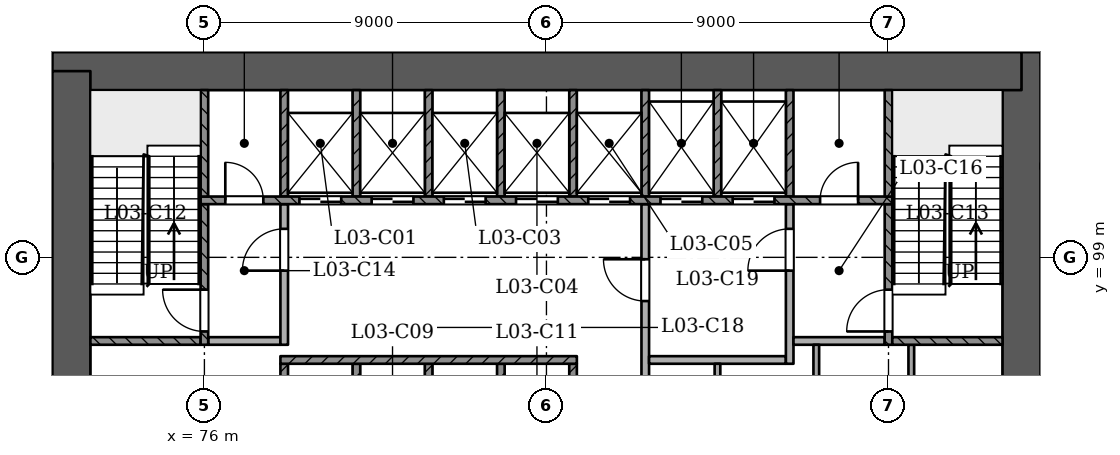
"""IFC4 building model, lengths in metres.
Left out: names, types, materials, properties, quantities, classifications, styles, units other than length and angle.
Written with IfcOpenShell. Run it as: python <this file> out.ifc"""

import sys

from ifc_helpers import new_model, si_unit, direction, frame, frame_2d, origin, place, context, subcontext, project, spatial, rectangle, extrude, element, fill, save


model = new_model("IFC4")
c1 = context("Model", 3, precision=1e-05, world=origin(), true_north=direction((0.0, 1.0)))
c2 = subcontext(c1, "Body", "Model", "MODEL_VIEW")
j1 = project(units=[si_unit("LENGTHUNIT", "METRE"), si_unit("PLANEANGLEUNIT", "RADIAN")], contexts=[c1])
p1 = place(None, origin())
s1 = spatial("IfcSite", under=j1, at=p1, CompositionType="ELEMENT")
p2 = place(p1, origin())
s2 = spatial("IfcBuilding", under=s1, at=p2, CompositionType="ELEMENT")
p3 = place(p2, frame((0.0, 0.0, 18.0)))
s3 = spatial("IfcBuildingStorey", under=s2, at=p3, CompositionType="ELEMENT", Elevation=18.0)
p4 = place(p3, frame((97.5, 92.9, 0.0), z_axis=(0.0, 0.0, 1.0), x_axis=(0.0, 1.0, 0.0)))
e1 = element("IfcWall", 1, at=p4, inside=s3, PredefinedType="SHEAR", context=c2, shape_type="SweptSolid", body=[
    extrude(rectangle(XDim=11.5, YDim=1.0, at=frame_2d((5.75, 0.0))), origin(), (0.0, 0.0, 1.0), 4.5),
])
p5 = place(p3, frame((97.5, 103.9, 0.0), z_axis=(0.0, 0.0, 1.0), x_axis=(-1.0, 0.0, 0.0)))
e2 = element("IfcWall", 2, at=p5, inside=s3, PredefinedType="SHEAR", context=c2, shape_type="SweptSolid", body=[
    extrude(rectangle(XDim=25.5, YDim=1.0, at=frame_2d((12.75, 0.0))), origin(), (0.0, 0.0, 1.0), 4.5),
])
p6 = place(p3, frame((72.5, 103.9, 0.0), z_axis=(0.0, 0.0, 1.0), x_axis=(0.0, -1.0, 0.0)))
e3 = element("IfcWall", 3, at=p6, inside=s3, PredefinedType="SHEAR", context=c2, shape_type="SweptSolid", body=[
    extrude(rectangle(XDim=11.5, YDim=1.0, at=frame_2d((5.75, 0.0))), origin(), (0.0, 0.0, 1.0), 4.5),
])
for number, where, z_axis, x_axis in (
    (4, (99.726, 101.4, 0.0), (0.0, 0.0, 1.0), (-1.0, 0.0, 0.0)),
    (5, (72.0, 101.401, 0.0), (0.0, 0.0, 1.0), (-1.0, -0.0, 0.0)),
):
    element("IfcWall", number, at=place(p3, frame(where, z_axis=z_axis, x_axis=x_axis)), inside=s3, PredefinedType="PARTITIONING", context=c2, shape_type="SweptSolid", body=[
        extrude(rectangle(XDim=1.726, YDim=0.15, at=frame_2d((0.863, 0.0))), origin(), (0.0, 0.0, 1.0), 4.05),
    ])
for number, where, z_axis, x_axis in (
    (6, (78.1, 93.4, 0.0), (0.0, 0.0, 1.0), (0.0, 1.0, 0.0)),
    (7, (80.0, 93.4, 0.0), (0.0, 0.0, 1.0), (0.0, 1.0, 0.0)),
    (8, (81.9, 93.4, 0.0), (0.0, 0.0, 1.0), (0.0, 1.0, 0.0)),
    (9, (83.8, 93.4, 0.0), (0.0, 0.0, 1.0), (0.0, 1.0, 0.0)),
    (10, (85.7, 93.4, 0.0), (0.0, 0.0, 1.0), (0.0, 1.0, 0.0)),
):
    element("IfcWall", number, at=place(p3, frame(where, z_axis=z_axis, x_axis=x_axis)), inside=s3, PredefinedType="SOLIDWALL", context=c2, shape_type="SweptSolid", body=[
        extrude(rectangle(XDim=2.8, YDim=0.2, at=frame_2d((1.4, 0.0))), origin(), (0.0, 0.0, 1.0), 4.05),
    ])
p7 = place(p3, frame((87.6, 93.4, 0.0), z_axis=(0.0, 0.0, 1.0), x_axis=(0.0, 1.0, 0.0)))
e11 = element("IfcWall", 11, at=p7, inside=s3, PredefinedType="PARTITIONING", context=c2, shape_type="SweptSolid", body=[
    extrude(rectangle(XDim=7.0, YDim=0.2, at=frame_2d((3.5, 0.0))), origin(), (0.0, 0.0, 1.0), 4.05),
])
p8 = place(p7, frame((4.45, 0.0, 0.0)))
e12 = element("IfcOpeningElement", 12, at=p8, cuts=e11, PredefinedType="OPENING", context=c2, shape_type="SweptSolid", body=[
    extrude(rectangle(XDim=1.1, YDim=2.1, at=frame_2d((0.55, 1.05))), frame((0.0, 0.11, 0.0), z_axis=(0.0, -1.0, 0.0), x_axis=(1.0, 0.0, 0.0)), (0.0, 0.0, 1.0), 0.221),
])
p9 = place(p3, frame((89.5, 93.4, 0.0), z_axis=(0.0, 0.0, 1.0), x_axis=(0.0, 1.0, 0.0)))
e13 = element("IfcWall", 13, at=p9, inside=s3, PredefinedType="PARTITIONING", context=c2, shape_type="SweptSolid", body=[
    extrude(rectangle(XDim=2.8, YDim=0.15, at=frame_2d((1.4, 0.0))), origin(), (0.0, 0.0, 1.0), 4.05),
])
for number, where, z_axis, x_axis in (
    (14, (92.1, 93.4, 0.0), (0.0, 0.0, 1.0), (0.0, 1.0, 0.0)),
    (15, (94.6, 93.4, 0.0), (0.0, 0.0, 1.0), (0.0, 1.0, 0.0)),
):
    element("IfcWall", number, at=place(p3, frame(where, z_axis=z_axis, x_axis=x_axis)), inside=s3, PredefinedType="PARTITIONING", context=c2, shape_type="SweptSolid", body=[
        extrude(rectangle(XDim=3.3, YDim=0.15, at=frame_2d((1.65, 0.0))), origin(), (0.0, 0.0, 1.0), 4.05),
    ])
p10 = place(p3, frame((78.0, 96.3, 0.0), z_axis=(0.0, 0.0, 1.0), x_axis=(1.0, 0.0, 0.0)))
e16 = element("IfcWall", 16, at=p10, inside=s3, PredefinedType="SOLIDWALL", context=c2, shape_type="SweptSolid", body=[
    extrude(rectangle(XDim=7.8, YDim=0.2, at=frame_2d((3.9, 0.0))), origin(), (0.0, 0.0, 1.0), 4.05),
])
p11 = place(p3, frame((87.7, 96.3, 0.0), z_axis=(0.0, 0.0, 1.0), x_axis=(1.0, 0.0, 0.0)))
e17 = element("IfcWall", 17, at=p11, inside=s3, PredefinedType="PARTITIONING", context=c2, shape_type="SweptSolid", body=[
    extrude(rectangle(XDim=3.6, YDim=0.2, at=frame_2d((1.8, 0.0))), origin(), (0.0, 0.0, 1.0), 4.05),
])
p12 = place(p3, frame((91.4, 96.2, 0.0), z_axis=(0.0, 0.0, 1.0), x_axis=(0.0, 1.0, 0.0)))
e18 = element("IfcWall", 18, at=p12, inside=s3, PredefinedType="PARTITIONING", context=c2, shape_type="SweptSolid", body=[
    extrude(rectangle(XDim=4.2, YDim=0.2, at=frame_2d((2.1, 0.0))), origin(), (0.0, 0.0, 1.0), 4.05),
])
p13 = place(p12, frame((2.45, 0.0, 0.0)))
e19 = element("IfcOpeningElement", 19, at=p13, cuts=e18, PredefinedType="OPENING", context=c2, shape_type="SweptSolid", body=[
    extrude(rectangle(XDim=1.1, YDim=2.1, at=frame_2d((0.55, 1.05))), frame((0.0, 0.11, 0.0), z_axis=(0.0, -1.0, 0.0), x_axis=(1.0, 0.0, 0.0)), (0.0, 0.0, 1.0), 0.221),
])
p14 = place(p3, frame((73.0, 96.8, 0.0), z_axis=(0.0, 0.0, 1.0), x_axis=(1.0, 0.0, 0.0)))
e20 = element("IfcWall", 20, at=p14, inside=s3, PredefinedType="SOLIDWALL", context=c2, shape_type="SweptSolid", body=[
    extrude(rectangle(XDim=2.9, YDim=0.2, at=frame_2d((1.45, 0.0))), origin(), (0.0, 0.0, 1.0), 4.05),
])
p15 = place(p3, frame((76.0, 96.7, 0.0), z_axis=(0.0, 0.0, 1.0), x_axis=(0.0, 1.0, 0.0)))
e21 = element("IfcWall", 21, at=p15, inside=s3, PredefinedType="SOLIDWALL", context=c2, shape_type="SweptSolid", body=[
    extrude(rectangle(XDim=3.7, YDim=0.2, at=frame_2d((1.85, 0.0))), origin(), (0.0, 0.0, 1.0), 4.05),
])
p16 = place(p15, frame((0.35, 0.0, 0.0)))
e22 = element("IfcOpeningElement", 22, at=p16, cuts=e21, PredefinedType="OPENING", context=c2, shape_type="SweptSolid", body=[
    extrude(rectangle(XDim=1.1, YDim=2.1, at=frame_2d((0.55, 1.05))), frame((0.0, 0.11, 0.0), z_axis=(0.0, -1.0, 0.0), x_axis=(1.0, 0.0, 0.0)), (0.0, 0.0, 1.0), 0.221),
])
p17 = place(p3, frame((76.1, 96.8, 0.0), z_axis=(0.0, 0.0, 1.0), x_axis=(1.0, 0.0, 0.0)))
e23 = element("IfcWall", 23, at=p17, inside=s3, PredefinedType="PARTITIONING", context=c2, shape_type="SweptSolid", body=[
    extrude(rectangle(XDim=1.9, YDim=0.2, at=frame_2d((0.95, 0.0))), origin(), (0.0, 0.0, 1.0), 4.05),
])
p18 = place(p3, frame((78.1, 96.7, 0.0), z_axis=(0.0, 0.0, 1.0), x_axis=(0.0, 1.0, 0.0)))
e24 = element("IfcWall", 24, at=p18, inside=s3, PredefinedType="PARTITIONING", context=c2, shape_type="SweptSolid", body=[
    extrude(rectangle(XDim=3.7, YDim=0.2, at=frame_2d((1.85, 0.0))), origin(), (0.0, 0.0, 1.0), 4.05),
])
p19 = place(p18, frame((1.95, 0.0, 0.0)))
e25 = element("IfcOpeningElement", 25, at=p19, cuts=e24, PredefinedType="OPENING", context=c2, shape_type="SweptSolid", body=[
    extrude(rectangle(XDim=1.1, YDim=2.1, at=frame_2d((0.55, 1.05))), frame((0.0, 0.11, 0.0), z_axis=(0.0, -1.0, 0.0), x_axis=(1.0, 0.0, 0.0)), (0.0, 0.0, 1.0), 0.221),
])
p20 = place(p3, frame((91.5, 96.8, 0.0), z_axis=(0.0, 0.0, 1.0), x_axis=(1.0, 0.0, 0.0)))
e26 = element("IfcWall", 26, at=p20, inside=s3, PredefinedType="PARTITIONING", context=c2, shape_type="SweptSolid", body=[
    extrude(rectangle(XDim=2.4, YDim=0.2, at=frame_2d((1.2, 0.0))), origin(), (0.0, 0.0, 1.0), 4.05),
])
p21 = place(p3, frame((94.0, 96.7, 0.0), z_axis=(0.0, 0.0, 1.0), x_axis=(0.0, 1.0, 0.0)))
e27 = element("IfcWall", 27, at=p21, inside=s3, PredefinedType="SOLIDWALL", context=c2, shape_type="SweptSolid", body=[
    extrude(rectangle(XDim=3.7, YDim=0.2, at=frame_2d((1.85, 0.0))), origin(), (0.0, 0.0, 1.0), 4.05),
])
p22 = place(p21, frame((0.35, 0.0, 0.0)))
e28 = element("IfcOpeningElement", 28, at=p22, cuts=e27, PredefinedType="OPENING", context=c2, shape_type="SweptSolid", body=[
    extrude(rectangle(XDim=1.1, YDim=2.1, at=frame_2d((0.55, 1.05))), frame((0.0, 0.11, 0.0), z_axis=(0.0, -1.0, 0.0), x_axis=(1.0, 0.0, 0.0)), (0.0, 0.0, 1.0), 0.221),
])
p23 = place(p3, frame((94.1, 96.8, 0.0), z_axis=(0.0, 0.0, 1.0), x_axis=(1.0, 0.0, 0.0)))
e29 = element("IfcWall", 29, at=p23, inside=s3, PredefinedType="SOLIDWALL", context=c2, shape_type="SweptSolid", body=[
    extrude(rectangle(XDim=2.9, YDim=0.2, at=frame_2d((1.45, 0.0))), origin(), (0.0, 0.0, 1.0), 4.05),
])
p24 = place(p3, frame((75.9, 100.5, 0.0), z_axis=(0.0, 0.0, 1.0), x_axis=(1.0, 0.0, 0.0)))
e30 = element("IfcWall", 30, at=p24, inside=s3, PredefinedType="SOLIDWALL", context=c2, shape_type="SweptSolid", body=[
    extrude(rectangle(XDim=18.2, YDim=0.2, at=frame_2d((9.1, 0.0))), origin(), (0.0, 0.0, 1.0), 4.05),
])
p25 = place(p24, frame((2.6, 0.0, 0.0)))
e31 = element("IfcOpeningElement", 31, at=p25, cuts=e30, PredefinedType="OPENING", context=c2, shape_type="SweptSolid", body=[
    extrude(rectangle(XDim=1.1, YDim=2.1, at=frame_2d((0.55, 1.05))), frame((0.0, 0.11, 0.0), z_axis=(0.0, -1.0, 0.0), x_axis=(1.0, 0.0, 0.0)), (0.0, 0.0, 1.0), 0.221),
])
p26 = place(p24, frame((4.5, 0.0, 0.0)))
e32 = element("IfcOpeningElement", 32, at=p26, cuts=e30, PredefinedType="OPENING", context=c2, shape_type="SweptSolid", body=[
    extrude(rectangle(XDim=1.1, YDim=2.1, at=frame_2d((0.55, 1.05))), frame((0.0, 0.11, 0.0), z_axis=(0.0, -1.0, 0.0), x_axis=(1.0, 0.0, 0.0)), (0.0, 0.0, 1.0), 0.221),
])
p27 = place(p24, frame((6.4, 0.0, 0.0)))
e33 = element("IfcOpeningElement", 33, at=p27, cuts=e30, PredefinedType="OPENING", context=c2, shape_type="SweptSolid", body=[
    extrude(rectangle(XDim=1.1, YDim=2.1, at=frame_2d((0.55, 1.05))), frame((0.0, 0.11, 0.0), z_axis=(0.0, -1.0, 0.0), x_axis=(1.0, 0.0, 0.0)), (0.0, 0.0, 1.0), 0.221),
])
p28 = place(p24, frame((8.3, 0.0, 0.0)))
e34 = element("IfcOpeningElement", 34, at=p28, cuts=e30, PredefinedType="OPENING", context=c2, shape_type="SweptSolid", body=[
    extrude(rectangle(XDim=1.1, YDim=2.1, at=frame_2d((0.55, 1.05))), frame((0.0, 0.11, 0.0), z_axis=(0.0, -1.0, 0.0), x_axis=(1.0, 0.0, 0.0)), (0.0, 0.0, 1.0), 0.221),
])
p29 = place(p24, frame((10.2, 0.0, 0.0)))
e35 = element("IfcOpeningElement", 35, at=p29, cuts=e30, PredefinedType="OPENING", context=c2, shape_type="SweptSolid", body=[
    extrude(rectangle(XDim=1.1, YDim=2.1, at=frame_2d((0.55, 1.05))), frame((0.0, 0.11, 0.0), z_axis=(0.0, -1.0, 0.0), x_axis=(1.0, 0.0, 0.0)), (0.0, 0.0, 1.0), 0.221),
])
p30 = place(p24, frame((12.1, 0.0, 0.0)))
e36 = element("IfcOpeningElement", 36, at=p30, cuts=e30, PredefinedType="OPENING", context=c2, shape_type="SweptSolid", body=[
    extrude(rectangle(XDim=1.1, YDim=2.1, at=frame_2d((0.55, 1.05))), frame((0.0, 0.11, 0.0), z_axis=(0.0, -1.0, 0.0), x_axis=(1.0, 0.0, 0.0)), (0.0, 0.0, 1.0), 0.221),
])
p31 = place(p24, frame((14.0, 0.0, 0.0)))
e37 = element("IfcOpeningElement", 37, at=p31, cuts=e30, PredefinedType="OPENING", context=c2, shape_type="SweptSolid", body=[
    extrude(rectangle(XDim=1.1, YDim=2.1, at=frame_2d((0.55, 1.05))), frame((0.0, 0.11, 0.0), z_axis=(0.0, -1.0, 0.0), x_axis=(1.0, 0.0, 0.0)), (0.0, 0.0, 1.0), 0.221),
])
p32 = place(p24, frame((0.65, 0.0, 0.0)))
e38 = element("IfcOpeningElement", 38, at=p32, cuts=e30, PredefinedType="OPENING", context=c2, shape_type="SweptSolid", body=[
    extrude(rectangle(XDim=1.0, YDim=2.1, at=frame_2d((0.5, 1.05))), frame((0.0, 0.11, 0.0), z_axis=(0.0, -1.0, 0.0), x_axis=(1.0, 0.0, 0.0)), (0.0, 0.0, 1.0), 0.221),
])
p33 = place(p24, frame((16.3, 0.0, 0.0)))
e39 = element("IfcOpeningElement", 39, at=p33, cuts=e30, PredefinedType="OPENING", context=c2, shape_type="SweptSolid", body=[
    extrude(rectangle(XDim=1.0, YDim=2.1, at=frame_2d((0.5, 1.05))), frame((0.0, 0.11, 0.0), z_axis=(0.0, -1.0, 0.0), x_axis=(1.0, 0.0, 0.0)), (0.0, 0.0, 1.0), 0.221),
])
for number, where, z_axis, x_axis in (
    (40, (76.0, 100.6, 0.0), (0.0, 0.0, 1.0), (0.0, 1.0, 0.0)),
    (41, (78.1, 100.6, 0.0), (0.0, 0.0, 1.0), (0.0, 1.0, 0.0)),
    (42, (80.0, 100.6, 0.0), (0.0, 0.0, 1.0), (0.0, 1.0, 0.0)),
    (43, (81.9, 100.6, 0.0), (0.0, 0.0, 1.0), (0.0, 1.0, 0.0)),
    (44, (83.8, 100.6, 0.0), (0.0, 0.0, 1.0), (0.0, 1.0, 0.0)),
    (45, (85.7, 100.6, 0.0), (0.0, 0.0, 1.0), (0.0, 1.0, 0.0)),
    (46, (87.6, 100.6, 0.0), (0.0, 0.0, 1.0), (0.0, 1.0, 0.0)),
    (47, (89.5, 100.6, 0.0), (0.0, 0.0, 1.0), (0.0, 1.0, 0.0)),
    (48, (91.4, 100.6, 0.0), (0.0, 0.0, 1.0), (0.0, 1.0, 0.0)),
    (49, (94.0, 100.6, 0.0), (0.0, 0.0, 1.0), (0.0, 1.0, 0.0)),
):
    element("IfcWall", number, at=place(p3, frame(where, z_axis=z_axis, x_axis=x_axis)), inside=s3, PredefinedType="SOLIDWALL", context=c2, shape_type="SweptSolid", body=[
        extrude(rectangle(XDim=2.8, YDim=0.2, at=frame_2d((1.4, 0.0))), origin(), (0.0, 0.0, 1.0), 4.05),
    ])
p34 = place(p25, origin())
e50 = element("IfcDoor", 50, at=p34, inside=s3, OperationType="SLIDING_TO_RIGHT", PredefinedType="NOTDEFINED", context=c2, shape_type="SweptSolid", body=[
    extrude(rectangle(XDim=1.1, YDim=2.1, at=frame_2d((0.55, 1.05))), frame((0.0, 0.025, 0.0), z_axis=(0.0, -1.0, 0.0), x_axis=(1.0, 0.0, 0.0)), (0.0, 0.0, 1.0), 0.05),
])
fill(e31, e50)
p35 = place(p26, origin())
e51 = element("IfcDoor", 51, at=p35, inside=s3, OperationType="SLIDING_TO_LEFT", PredefinedType="NOTDEFINED", context=c2, shape_type="SweptSolid", body=[
    extrude(rectangle(XDim=1.1, YDim=2.1, at=frame_2d((0.55, 1.05))), frame((0.0, 0.025, 0.0), z_axis=(0.0, -1.0, 0.0), x_axis=(1.0, 0.0, 0.0)), (0.0, 0.0, 1.0), 0.05),
])
fill(e32, e51)
p36 = place(p27, origin())
e52 = element("IfcDoor", 52, at=p36, inside=s3, OperationType="SLIDING_TO_RIGHT", PredefinedType="NOTDEFINED", context=c2, shape_type="SweptSolid", body=[
    extrude(rectangle(XDim=1.1, YDim=2.1, at=frame_2d((0.55, 1.05))), frame((0.0, 0.025, 0.0), z_axis=(0.0, -1.0, 0.0), x_axis=(1.0, 0.0, 0.0)), (0.0, 0.0, 1.0), 0.05),
])
fill(e33, e52)
p37 = place(p28, origin())
e53 = element("IfcDoor", 53, at=p37, inside=s3, OperationType="SLIDING_TO_LEFT", PredefinedType="NOTDEFINED", context=c2, shape_type="SweptSolid", body=[
    extrude(rectangle(XDim=1.1, YDim=2.1, at=frame_2d((0.55, 1.05))), frame((0.0, 0.025, 0.0), z_axis=(0.0, -1.0, 0.0), x_axis=(1.0, 0.0, 0.0)), (0.0, 0.0, 1.0), 0.05),
])
fill(e34, e53)
p38 = place(p29, origin())
e54 = element("IfcDoor", 54, at=p38, inside=s3, OperationType="SLIDING_TO_RIGHT", PredefinedType="NOTDEFINED", context=c2, shape_type="SweptSolid", body=[
    extrude(rectangle(XDim=1.1, YDim=2.1, at=frame_2d((0.55, 1.05))), frame((0.0, 0.025, 0.0), z_axis=(0.0, -1.0, 0.0), x_axis=(1.0, 0.0, 0.0)), (0.0, 0.0, 1.0), 0.05),
])
fill(e35, e54)
p39 = place(p30, origin())
e55 = element("IfcDoor", 55, at=p39, inside=s3, OperationType="SLIDING_TO_RIGHT", PredefinedType="NOTDEFINED", context=c2, shape_type="SweptSolid", body=[
    extrude(rectangle(XDim=1.1, YDim=2.1, at=frame_2d((0.55, 1.05))), frame((0.0, 0.025, 0.0), z_axis=(0.0, -1.0, 0.0), x_axis=(1.0, 0.0, 0.0)), (0.0, 0.0, 1.0), 0.05),
])
fill(e36, e55)
p40 = place(p31, origin())
e56 = element("IfcDoor", 56, at=p40, inside=s3, OperationType="SLIDING_TO_LEFT", PredefinedType="NOTDEFINED", context=c2, shape_type="SweptSolid", body=[
    extrude(rectangle(XDim=1.1, YDim=2.1, at=frame_2d((0.55, 1.05))), frame((0.0, 0.025, 0.0), z_axis=(0.0, -1.0, 0.0), x_axis=(1.0, 0.0, 0.0)), (0.0, 0.0, 1.0), 0.05),
])
fill(e37, e56)
p41 = place(p16, origin())
e57 = element("IfcDoor", 57, at=p41, inside=s3, OperationType="SINGLE_SWING_RIGHT", PredefinedType="NOTDEFINED", context=c2, shape_type="SweptSolid", body=[
    extrude(rectangle(XDim=1.1, YDim=2.1, at=frame_2d((0.55, 1.05))), frame((0.0, 0.025, 0.0), z_axis=(0.0, -1.0, 0.0), x_axis=(1.0, 0.0, 0.0)), (0.0, 0.0, 1.0), 0.05),
])
fill(e22, e57)
p42 = place(p22, origin())
e58 = element("IfcDoor", 58, at=p42, inside=s3, OperationType="SINGLE_SWING_LEFT", PredefinedType="NOTDEFINED", context=c2, shape_type="SweptSolid", body=[
    extrude(rectangle(XDim=1.1, YDim=2.1, at=frame_2d((0.55, 1.05))), frame((0.0, 0.025, 0.0), z_axis=(0.0, -1.0, 0.0), x_axis=(1.0, 0.0, 0.0)), (0.0, 0.0, 1.0), 0.05),
])
fill(e28, e58)
p43 = place(p19, origin())
e59 = element("IfcDoor", 59, at=p43, inside=s3, OperationType="SINGLE_SWING_LEFT", PredefinedType="NOTDEFINED", context=c2, shape_type="SweptSolid", body=[
    extrude(rectangle(XDim=1.1, YDim=2.1, at=frame_2d((0.55, 1.05))), frame((0.0, 0.025, 0.0), z_axis=(0.0, -1.0, 0.0), x_axis=(1.0, 0.0, 0.0)), (0.0, 0.0, 1.0), 0.05),
])
fill(e25, e59)
p44 = place(p8, origin())
e60 = element("IfcDoor", 60, at=p44, inside=s3, OperationType="SINGLE_SWING_RIGHT", PredefinedType="NOTDEFINED", context=c2, shape_type="SweptSolid", body=[
    extrude(rectangle(XDim=1.1, YDim=2.1, at=frame_2d((0.55, 1.05))), frame((0.0, 0.025, 0.0), z_axis=(0.0, -1.0, 0.0), x_axis=(1.0, 0.0, 0.0)), (0.0, 0.0, 1.0), 0.05),
])
fill(e12, e60)
p45 = place(p13, origin())
e61 = element("IfcDoor", 61, at=p45, inside=s3, OperationType="SINGLE_SWING_LEFT", PredefinedType="NOTDEFINED", context=c2, shape_type="SweptSolid", body=[
    extrude(rectangle(XDim=1.1, YDim=2.1, at=frame_2d((0.55, 1.05))), frame((0.0, 0.025, 0.0), z_axis=(0.0, -1.0, 0.0), x_axis=(1.0, 0.0, 0.0)), (0.0, 0.0, 1.0), 0.05),
])
fill(e19, e61)
p46 = place(p32, origin())
e62 = element("IfcDoor", 62, at=p46, inside=s3, OperationType="SINGLE_SWING_LEFT", PredefinedType="NOTDEFINED", context=c2, shape_type="SweptSolid", body=[
    extrude(rectangle(XDim=1.0, YDim=2.1, at=frame_2d((0.5, 1.05))), frame((0.0, 0.025, 0.0), z_axis=(0.0, -1.0, 0.0), x_axis=(1.0, 0.0, 0.0)), (0.0, 0.0, 1.0), 0.05),
])
fill(e38, e62)
p47 = place(p33, origin())
e63 = element("IfcDoor", 63, at=p47, inside=s3, OperationType="SINGLE_SWING_RIGHT", PredefinedType="NOTDEFINED", context=c2, shape_type="SweptSolid", body=[
    extrude(rectangle(XDim=1.0, YDim=2.1, at=frame_2d((0.5, 1.05))), frame((0.0, 0.025, 0.0), z_axis=(0.0, -1.0, 0.0), x_axis=(1.0, 0.0, 0.0)), (0.0, 0.0, 1.0), 0.05),
])
fill(e39, e63)
save(model, sys.argv[1])
